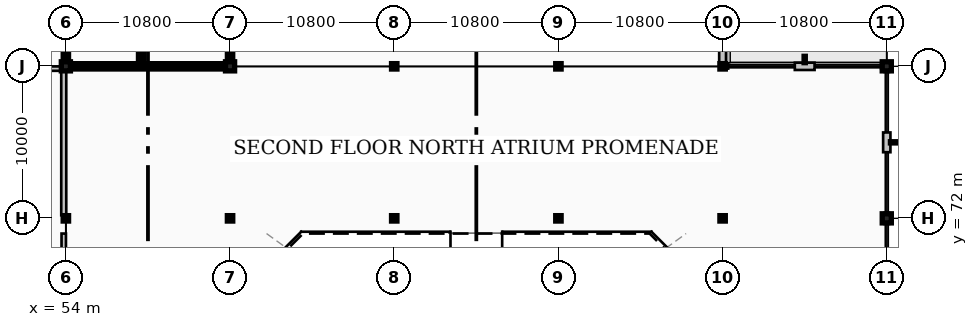
"""IFC4 building model, lengths in metres.
Left out: names, types, materials, properties, quantities, classifications, styles, units other than length and angle.
Written with IfcOpenShell. Run it as: python <this file> out.ifc"""

import sys

from ifc_helpers import new_model, si_unit, direction, frame, frame_2d, origin, origin_2d, place, context, subcontext, project, spatial, rectangle, hollow_circle, extrude, element, save


model = new_model("IFC4")
c1 = context("Model", 3, precision=1e-05, world=origin(), true_north=direction((0.0, 1.0)))
c2 = subcontext(c1, "Body", "Model", "MODEL_VIEW")
j1 = project(units=[si_unit("LENGTHUNIT", "METRE"), si_unit("PLANEANGLEUNIT", "RADIAN")], contexts=[c1])
p1 = place(None, origin())
s1 = spatial("IfcSite", under=j1, at=p1, CompositionType="ELEMENT")
p2 = place(p1, origin())
s2 = spatial("IfcBuilding", under=s1, at=p2, CompositionType="ELEMENT")
p3 = place(p2, frame((0.0, 0.0, 9.6)))
s3 = spatial("IfcBuildingStorey", under=s2, at=p3, CompositionType="ELEMENT", Elevation=9.6)
p4 = place(p3, frame((54.0, 72.0, 0.0), z_axis=(0.0, 0.0, 1.0), x_axis=(1.0, 0.0, 0.0)))
e1 = element("IfcColumn", 1, at=p4, inside=s3, PredefinedType="COLUMN", context=c2, shape_type="SweptSolid", body=[
    extrude(hollow_circle(Radius=0.178, WallThickness=0.016, at=origin_2d()), origin(), (0.0, 0.0, 1.0), 4.8),
])
p5 = place(p3, frame((54.0, 82.0, 0.0), z_axis=(0.0, 0.0, 1.0), x_axis=(1.0, 0.0, 0.0)))
e2 = element("IfcColumn", 2, at=p5, inside=s3, PredefinedType="COLUMN", context=c2, shape_type="SweptSolid", body=[
    extrude(rectangle(XDim=0.6, YDim=0.6, at=origin_2d()), origin(), (0.0, 0.0, 1.0), 4.8),
])
p6 = place(p3, frame((64.8, 72.0, 0.0), z_axis=(0.0, 0.0, 1.0), x_axis=(1.0, 0.0, 0.0)))
e3 = element("IfcColumn", 3, at=p6, inside=s3, PredefinedType="COLUMN", context=c2, shape_type="SweptSolid", body=[
    extrude(hollow_circle(Radius=0.178, WallThickness=0.016, at=origin_2d()), origin(), (0.0, 0.0, 1.0), 4.8),
])
p7 = place(p3, frame((64.8, 82.0, 0.0), z_axis=(0.0, 0.0, 1.0), x_axis=(1.0, 0.0, 0.0)))
e4 = element("IfcColumn", 4, at=p7, inside=s3, PredefinedType="COLUMN", context=c2, shape_type="SweptSolid", body=[
    extrude(rectangle(XDim=0.6, YDim=0.6, at=origin_2d()), origin(), (0.0, 0.0, 1.0), 4.8),
])
for number, where, z_axis, x_axis in (
    (5, (75.6, 72.0, 0.0), (0.0, 0.0, 1.0), (1.0, 0.0, 0.0)),
    (6, (75.6, 82.0, 0.0), (0.0, 0.0, 1.0), (1.0, 0.0, 0.0)),
    (7, (86.4, 72.0, 0.0), (0.0, 0.0, 1.0), (1.0, 0.0, 0.0)),
    (8, (86.4, 82.0, 0.0), (0.0, 0.0, 1.0), (1.0, 0.0, 0.0)),
    (9, (97.2, 72.0, 0.0), (0.0, 0.0, 1.0), (1.0, 0.0, 0.0)),
    (10, (97.2, 82.0, 0.0), (0.0, 0.0, 1.0), (1.0, 0.0, 0.0)),
):
    element("IfcColumn", number, at=place(p3, frame(where, z_axis=z_axis, x_axis=x_axis)), inside=s3, PredefinedType="COLUMN", context=c2, shape_type="SweptSolid", body=[
        extrude(hollow_circle(Radius=0.178, WallThickness=0.016, at=origin_2d()), origin(), (0.0, 0.0, 1.0), 4.8),
    ])
for number, where, z_axis, x_axis in (
    (11, (108.0, 72.0, 0.0), (0.0, 0.0, 1.0), (1.0, 0.0, 0.0)),
    (12, (108.0, 82.0, 0.0), (0.0, 0.0, 1.0), (1.0, 0.0, 0.0)),
):
    element("IfcColumn", number, at=place(p3, frame(where, z_axis=z_axis, x_axis=x_axis)), inside=s3, PredefinedType="COLUMN", context=c2, shape_type="SweptSolid", body=[
        extrude(rectangle(XDim=0.6, YDim=0.6, at=origin_2d()), origin(), (0.0, 0.0, 1.0), 4.8),
    ])
p8 = place(p3, frame((108.0, 71.63, 0.0), z_axis=(0.0, 0.0, 1.0), x_axis=(0.0, 1.0, 0.0)))
e13 = element("IfcWall", 13, at=p8, inside=s3, PredefinedType="STANDARD", context=c2, shape_type="SweptSolid", body=[
    extrude(rectangle(XDim=0.225, YDim=0.3, at=frame_2d((0.113, 0.0))), origin(), (0.0, 0.0, 1.0), 4.56),
])
p9 = place(p3, frame((108.0, 76.35, 0.0), z_axis=(0.0, 0.0, 1.0), x_axis=(0.0, 1.0, 0.0)))
e14 = element("IfcWall", 14, at=p9, inside=s3, PredefinedType="STANDARD", context=c2, shape_type="SweptSolid", body=[
    extrude(rectangle(XDim=1.3, YDim=0.48, at=frame_2d((0.65, 0.0))), origin(), (0.0, 0.0, 1.0), 4.56),
])
for number, where, z_axis, x_axis in (
    (15, (108.0, 72.145, 0.0), (0.0, 0.0, 1.0), (0.0, 1.0, 0.0)),
    (16, (108.0, 81.63, 0.0), (0.0, 0.0, 1.0), (0.0, 1.0, 0.0)),
):
    element("IfcWall", number, at=place(p3, frame(where, z_axis=z_axis, x_axis=x_axis)), inside=s3, PredefinedType="STANDARD", context=c2, shape_type="SweptSolid", body=[
        extrude(rectangle(XDim=0.225, YDim=0.3, at=frame_2d((0.113, 0.0))), origin(), (0.0, 0.0, 1.0), 4.56),
    ])
p10 = place(p3, frame((103.25, 82.0, 0.0), z_axis=(0.0, 0.0, 1.0), x_axis=(-1.0, 0.0, 0.0)))
e17 = element("IfcWall", 17, at=p10, inside=s3, PredefinedType="STANDARD", context=c2, shape_type="SweptSolid", body=[
    extrude(rectangle(XDim=1.3, YDim=0.48, at=frame_2d((0.65, 0.0))), origin(), (0.0, 0.0, 1.0), 4.11),
])
for number, where, z_axis, x_axis in (
    (18, (107.855, 82.0, 0.0), (0.0, 0.0, 1.0), (-1.0, 0.0, 0.0)),
    (19, (97.57, 82.0, 0.0), (0.0, 0.0, 1.0), (-1.0, 0.0, 0.0)),
):
    element("IfcWall", number, at=place(p3, frame(where, z_axis=z_axis, x_axis=x_axis)), inside=s3, PredefinedType="STANDARD", context=c2, shape_type="SweptSolid", body=[
        extrude(rectangle(XDim=0.225, YDim=0.3, at=frame_2d((0.113, 0.0))), origin(), (0.0, 0.0, 1.0), 4.56),
    ])
p11 = place(p3, frame((97.2, 82.145, 0.0), z_axis=(0.0, 0.0, 1.0), x_axis=(0.0, 1.0, 0.0)))
e20 = element("IfcWall", 20, at=p11, inside=s3, PredefinedType="STANDARD", context=c2, shape_type="SweptSolid", body=[
    extrude(rectangle(XDim=9.71, YDim=0.45, at=frame_2d((4.855, 0.0))), origin(), (0.0, 0.0, 1.0), 4.56),
])
p12 = place(p11, frame((2.805, 0.0, 1.0)))
e21 = element("IfcOpeningElement", 21, at=p12, cuts=e20, PredefinedType="OPENING", context=c2, shape_type="SweptSolid", body=[
    extrude(rectangle(XDim=4.1, YDim=1.9, at=frame_2d((2.05, 0.95))), frame((0.0, 0.235, 0.0), z_axis=(0.0, -1.0, 0.0), x_axis=(1.0, 0.0, 0.0)), (0.0, 0.0, 1.0), 0.47),
])
p13 = place(p3, frame((54.3, 82.0, 0.0), z_axis=(0.0, 0.0, 1.0), x_axis=(1.0, 0.0, 0.0)))
e22 = element("IfcWall", 22, at=p13, inside=s3, PredefinedType="SHEAR", context=c2, shape_type="SweptSolid", body=[
    extrude(rectangle(XDim=10.2, YDim=0.35, at=frame_2d((5.1, 0.0))), origin(), (0.0, 0.0, 1.0), 4.56),
])
p14 = place(p3, frame((54.0, 82.3, 0.0), z_axis=(0.0, 0.0, 1.0), x_axis=(0.0, 1.0, 0.0)))
e23 = element("IfcWall", 23, at=p14, inside=s3, PredefinedType="SHEAR", context=c2, shape_type="SweptSolid", body=[
    extrude(rectangle(XDim=9.4, YDim=0.35, at=frame_2d((4.7, 0.0))), origin(), (0.0, 0.0, 1.0), 4.56),
])
p15 = place(p3, frame((64.8, 82.3, 0.0), z_axis=(0.0, 0.0, 1.0), x_axis=(0.0, 1.0, 0.0)))
e24 = element("IfcWall", 24, at=p15, inside=s3, PredefinedType="SHEAR", context=c2, shape_type="SweptSolid", body=[
    extrude(rectangle(XDim=9.4, YDim=0.35, at=frame_2d((4.7, 0.0))), origin(), (0.0, 0.0, 1.0), 4.56),
])
p16 = place(p15, frame((0.88, 0.0, 0.0)))
e25 = element("IfcOpeningElement", 25, at=p16, cuts=e24, PredefinedType="OPENING", context=c2, shape_type="SweptSolid", body=[
    extrude(rectangle(XDim=1.8, YDim=2.25, at=frame_2d((0.9, 1.125))), frame((0.0, 0.185, 0.0), z_axis=(0.0, -1.0, 0.0), x_axis=(1.0, 0.0, 0.0)), (0.0, 0.0, 1.0), 0.37),
])
p17 = place(p3, frame((58.95, 82.175, 0.0), z_axis=(0.0, 0.0, 1.0), x_axis=(0.0, 1.0, 0.0)))
e26 = element("IfcWall", 26, at=p17, inside=s3, PredefinedType="SHEAR", context=c2, shape_type="SweptSolid", body=[
    extrude(rectangle(XDim=9.65, YDim=0.35, at=frame_2d((4.825, 0.0))), origin(), (0.0, 0.0, 1.0), 4.56),
])
p18 = place(p17, frame((0.9, 0.0, 0.0)))
e27 = element("IfcOpeningElement", 27, at=p18, cuts=e26, PredefinedType="OPENING", context=c2, shape_type="SweptSolid", body=[
    extrude(rectangle(XDim=1.1, YDim=2.2, at=frame_2d((0.55, 1.1))), frame((0.0, 0.185, 0.0), z_axis=(0.0, -1.0, 0.0), x_axis=(1.0, 0.0, 0.0)), (0.0, 0.0, 1.0), 0.37),
])
p19 = place(p3, frame((43.38, 81.85, 0.0), z_axis=(0.0, 0.0, 1.0), x_axis=(1.0, 0.0, 0.0)))
e28 = element("IfcWall", 28, at=p19, inside=s3, PredefinedType="PARTITIONING", context=c2, shape_type="SweptSolid", body=[
    extrude(rectangle(XDim=10.44, YDim=0.29, at=frame_2d((5.22, 0.0))), origin(), (0.0, 0.0, 1.0), 4.09),
])
p20 = place(p3, frame((53.86, 62.2, 0.0), z_axis=(0.0, 0.0, 1.0), x_axis=(0.0, 1.0, 0.0)))
e29 = element("IfcWall", 29, at=p20, inside=s3, PredefinedType="PARTITIONING", context=c2, shape_type="SweptSolid", body=[
    extrude(rectangle(XDim=8.8, YDim=0.29, at=frame_2d((4.4, 0.0))), origin(), (0.0, 0.0, 1.0), 4.52),
])
p21 = place(p3, frame((53.86, 72.2, 0.0), z_axis=(0.0, 0.0, 1.0), x_axis=(0.0, 1.0, 0.0)))
e30 = element("IfcWall", 30, at=p21, inside=s3, PredefinedType="PARTITIONING", context=c2, shape_type="SweptSolid", body=[
    extrude(rectangle(XDim=9.62, YDim=0.33, at=frame_2d((4.81, 0.0))), origin(), (0.0, 0.0, 1.0), 4.52),
])
save(model, sys.argv[1])
